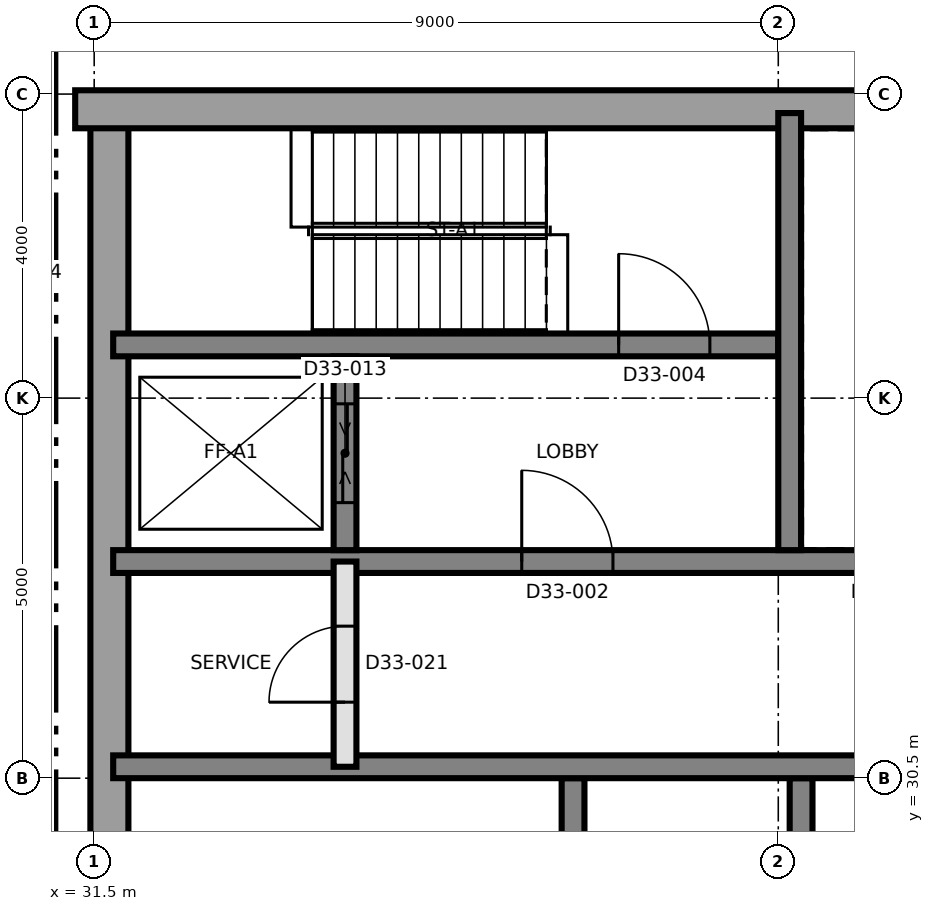
"""IFC4 building model, lengths in metres.
Left out: names, types, materials, properties, quantities, classifications, styles, units other than length and angle.
Written with IfcOpenShell. Run it as: python <this file> out.ifc"""

import sys

from ifc_helpers import new_model, si_unit, direction, frame, frame_2d, origin, place, context, subcontext, project, spatial, rectangle, extrude, element, fill, save


model = new_model("IFC4")
c1 = context("Model", 3, precision=1e-05, world=origin(), true_north=direction((0.0, 1.0)))
c2 = subcontext(c1, "Body", "Model", "MODEL_VIEW")
j1 = project(units=[si_unit("LENGTHUNIT", "METRE"), si_unit("PLANEANGLEUNIT", "RADIAN")], contexts=[c1])
p1 = place(None, origin())
s1 = spatial("IfcSite", under=j1, at=p1, CompositionType="ELEMENT")
p2 = place(p1, origin())
s2 = spatial("IfcBuilding", under=s1, at=p2, CompositionType="ELEMENT")
p3 = place(p2, frame((0.0, 0.0, 277.1)))
s3 = spatial("IfcBuildingStorey", under=s2, at=p3, CompositionType="ELEMENT", Elevation=277.1)
p4 = place(p3, frame((31.7, 21.75, 0.0), z_axis=(0.0, 0.0, 1.0), x_axis=(0.0, 1.0, 0.0)))
e1 = element("IfcWall", 1, at=p4, inside=s3, PredefinedType="SHEAR", context=c2, shape_type="SweptSolid", body=[
    extrude(rectangle(XDim=17.5, YDim=0.5, at=frame_2d((8.75, 0.0))), origin(), (0.0, 0.0, 1.0), 4.2),
])
p5 = place(p3, frame((31.25, 39.3, 0.0), z_axis=(0.0, 0.0, 1.0), x_axis=(1.0, 0.0, 0.0)))
e2 = element("IfcWall", 2, at=p5, inside=s3, PredefinedType="SHEAR", context=c2, shape_type="SweptSolid", body=[
    extrude(rectangle(XDim=27.0, YDim=0.5, at=frame_2d((13.5, 0.0))), origin(), (0.0, 0.0, 1.0), 4.2),
])
p6 = place(p3, frame((37.8, 21.75, 0.0), z_axis=(0.0, 0.0, 1.0), x_axis=(0.0, 1.0, 0.0)))
e3 = element("IfcWall", 3, at=p6, inside=s3, PredefinedType="SHEAR", context=c2, shape_type="SweptSolid", body=[
    extrude(rectangle(XDim=8.75, YDim=0.3, at=frame_2d((4.375, 0.0))), origin(), (0.0, 0.0, 1.0), 4.2),
])
p7 = place(p6, frame((5.525, 0.0, 0.0)))
e4 = element("IfcOpeningElement", 4, at=p7, cuts=e3, PredefinedType="OPENING", context=c2, shape_type="SweptSolid", body=[
    extrude(rectangle(XDim=1.0, YDim=2.1, at=frame_2d((0.5, 1.05))), frame((0.0, 0.16, 0.0), z_axis=(0.0, -1.0, 0.0), x_axis=(1.0, 0.0, 0.0)), (0.0, 0.0, 1.0), 0.32),
])
p8 = place(p3, frame((40.8, 21.75, 0.0), z_axis=(0.0, 0.0, 1.0), x_axis=(0.0, 1.0, 0.0)))
e5 = element("IfcWall", 5, at=p8, inside=s3, PredefinedType="SHEAR", context=c2, shape_type="SweptSolid", body=[
    extrude(rectangle(XDim=8.75, YDim=0.3, at=frame_2d((4.375, 0.0))), origin(), (0.0, 0.0, 1.0), 4.2),
])
p9 = place(p8, frame((4.338, 0.0, 0.0)))
e6 = element("IfcOpeningElement", 6, at=p9, cuts=e5, PredefinedType="OPENING", context=c2, shape_type="SweptSolid", body=[
    extrude(rectangle(XDim=1.0, YDim=2.1, at=frame_2d((0.5, 1.05))), frame((0.0, 0.16, 0.0), z_axis=(0.0, -1.0, 0.0), x_axis=(1.0, 0.0, 0.0)), (0.0, 0.0, 1.0), 0.32),
])
p10 = place(p3, frame((31.75, 30.65, 0.0), z_axis=(0.0, 0.0, 1.0), x_axis=(1.0, 0.0, 0.0)))
e7 = element("IfcWall", 7, at=p10, inside=s3, PredefinedType="SHEAR", context=c2, shape_type="SweptSolid", body=[
    extrude(rectangle(XDim=26.5, YDim=0.3, at=frame_2d((13.25, 0.0))), origin(), (0.0, 0.0, 1.0), 4.2),
])
p11 = place(p10, frame((24.75, 0.0, 0.0)))
e8 = element("IfcOpeningElement", 8, at=p11, cuts=e7, PredefinedType="OPENING", context=c2, shape_type="SweptSolid", body=[
    extrude(rectangle(XDim=1.0, YDim=2.1, at=frame_2d((0.5, 1.05))), frame((0.0, 0.16, 0.0), z_axis=(0.0, -1.0, 0.0), x_axis=(1.0, 0.0, 0.0)), (0.0, 0.0, 1.0), 0.32),
])
p12 = place(p10, frame((11.55, 0.0, 0.0)))
e9 = element("IfcOpeningElement", 9, at=p12, cuts=e7, PredefinedType="OPENING", context=c2, shape_type="SweptSolid", body=[
    extrude(rectangle(XDim=1.0, YDim=2.1, at=frame_2d((0.5, 1.05))), frame((0.0, 0.16, 0.0), z_axis=(0.0, -1.0, 0.0), x_axis=(1.0, 0.0, 0.0)), (0.0, 0.0, 1.0), 0.32),
])
p13 = place(p3, frame((31.75, 33.35, 0.0), z_axis=(0.0, 0.0, 1.0), x_axis=(1.0, 0.0, 0.0)))
e10 = element("IfcWall", 10, at=p13, inside=s3, PredefinedType="SHEAR", context=c2, shape_type="SweptSolid", body=[
    extrude(rectangle(XDim=26.5, YDim=0.3, at=frame_2d((13.25, 0.0))), origin(), (0.0, 0.0, 1.0), 4.2),
])
p14 = place(p13, frame((13.9, 0.0, 0.0)))
e11 = element("IfcOpeningElement", 11, at=p14, cuts=e10, PredefinedType="OPENING", context=c2, shape_type="SweptSolid", body=[
    extrude(rectangle(XDim=1.4, YDim=2.1, at=frame_2d((0.7, 1.05))), frame((0.0, 0.16, 0.0), z_axis=(0.0, -1.0, 0.0), x_axis=(1.0, 0.0, 0.0)), (0.0, 0.0, 1.0), 0.32),
])
p15 = place(p13, frame((5.375, 0.0, 0.0)))
e12 = element("IfcOpeningElement", 12, at=p15, cuts=e10, PredefinedType="OPENING", context=c2, shape_type="SweptSolid", body=[
    extrude(rectangle(XDim=1.2, YDim=2.1, at=frame_2d((0.6, 1.05))), frame((0.0, 0.16, 0.0), z_axis=(0.0, -1.0, 0.0), x_axis=(1.0, 0.0, 0.0)), (0.0, 0.0, 1.0), 0.32),
])
p16 = place(p13, frame((19.925, 0.0, 0.0)))
e13 = element("IfcOpeningElement", 13, at=p16, cuts=e10, PredefinedType="OPENING", context=c2, shape_type="SweptSolid", body=[
    extrude(rectangle(XDim=1.2, YDim=2.1, at=frame_2d((0.6, 1.05))), frame((0.0, 0.16, 0.0), z_axis=(0.0, -1.0, 0.0), x_axis=(1.0, 0.0, 0.0)), (0.0, 0.0, 1.0), 0.32),
])
p17 = place(p13, frame((9.8, 0.0, 0.0)))
e14 = element("IfcOpeningElement", 14, at=p17, cuts=e10, PredefinedType="OPENING", context=c2, shape_type="SweptSolid", body=[
    extrude(rectangle(XDim=0.9, YDim=2.1, at=frame_2d((0.45, 1.05))), frame((0.0, 0.16, 0.0), z_axis=(0.0, -1.0, 0.0), x_axis=(1.0, 0.0, 0.0)), (0.0, 0.0, 1.0), 0.32),
])
p18 = place(p3, frame((31.75, 36.2, 0.0), z_axis=(0.0, 0.0, 1.0), x_axis=(1.0, 0.0, 0.0)))
e15 = element("IfcWall", 15, at=p18, inside=s3, PredefinedType="SHEAR", context=c2, shape_type="SweptSolid", body=[
    extrude(rectangle(XDim=8.75, YDim=0.3, at=frame_2d((4.375, 0.0))), origin(), (0.0, 0.0, 1.0), 4.2),
])
p19 = place(p18, frame((6.65, 0.0, 0.0)))
e16 = element("IfcOpeningElement", 16, at=p19, cuts=e15, PredefinedType="OPENING", context=c2, shape_type="SweptSolid", body=[
    extrude(rectangle(XDim=1.2, YDim=2.1, at=frame_2d((0.6, 1.05))), frame((0.0, 0.16, 0.0), z_axis=(0.0, -1.0, 0.0), x_axis=(1.0, 0.0, 0.0)), (0.0, 0.0, 1.0), 0.32),
])
p20 = place(p3, frame((40.65, 33.5, 0.0), z_axis=(0.0, 0.0, 1.0), x_axis=(0.0, 1.0, 0.0)))
e17 = element("IfcWall", 17, at=p20, inside=s3, PredefinedType="SHEAR", context=c2, shape_type="SweptSolid", body=[
    extrude(rectangle(XDim=5.75, YDim=0.3, at=frame_2d((2.875, 0.0))), origin(), (0.0, 0.0, 1.0), 4.2),
])
p21 = place(p3, frame((34.8, 33.5, 0.0), z_axis=(0.0, 0.0, 1.0), x_axis=(0.0, 1.0, 0.0)))
e18 = element("IfcWall", 18, at=p21, inside=s3, PredefinedType="SHEAR", context=c2, shape_type="SweptSolid", body=[
    extrude(rectangle(XDim=2.55, YDim=0.3, at=frame_2d((1.275, 0.0))), origin(), (0.0, 0.0, 1.0), 4.2),
])
p22 = place(p21, frame((0.625, 0.0, 0.0)))
e19 = element("IfcOpeningElement", 19, at=p22, cuts=e18, PredefinedType="OPENING", context=c2, shape_type="SweptSolid", body=[
    extrude(rectangle(XDim=1.3, YDim=2.4, at=frame_2d((0.65, 1.2))), frame((0.0, 0.16, 0.0), z_axis=(0.0, -1.0, 0.0), x_axis=(1.0, 0.0, 0.0)), (0.0, 0.0, 1.0), 0.32),
])
p23 = place(p3, frame((34.8, 30.65, 0.0), z_axis=(0.0, 0.0, 1.0), x_axis=(0.0, 1.0, 0.0)))
e20 = element("IfcWall", 20, at=p23, inside=s3, PredefinedType="SOLIDWALL", context=c2, shape_type="SweptSolid", body=[
    extrude(rectangle(XDim=2.7, YDim=0.3, at=frame_2d((1.35, 0.0))), origin(), (0.0, 0.0, 1.0), 3.9),
])
p24 = place(p23, frame((0.85, 0.0, 0.0)))
e21 = element("IfcOpeningElement", 21, at=p24, cuts=e20, PredefinedType="OPENING", context=c2, shape_type="SweptSolid", body=[
    extrude(rectangle(XDim=1.0, YDim=2.1, at=frame_2d((0.5, 1.05))), frame((0.0, 0.16, 0.0), z_axis=(0.0, -1.0, 0.0), x_axis=(1.0, 0.0, 0.0)), (0.0, 0.0, 1.0), 0.32),
])
p25 = place(p15, origin())
e22 = element("IfcDoor", 22, at=p25, inside=s3, OperationType="SINGLE_SWING_LEFT", PredefinedType="DOOR", context=c2, shape_type="SweptSolid", body=[
    extrude(rectangle(XDim=1.2, YDim=2.1, at=frame_2d((0.6, 1.05))), frame((0.0, 0.025, 0.0), z_axis=(0.0, -1.0, 0.0), x_axis=(1.0, 0.0, 0.0)), (0.0, 0.0, 1.0), 0.05),
])
fill(e12, e22)
p26 = place(p19, origin())
e23 = element("IfcDoor", 23, at=p26, inside=s3, OperationType="SINGLE_SWING_RIGHT", PredefinedType="DOOR", context=c2, shape_type="SweptSolid", body=[
    extrude(rectangle(XDim=1.2, YDim=2.1, at=frame_2d((0.6, 1.05))), frame((0.0, 0.025, 0.0), z_axis=(0.0, -1.0, 0.0), x_axis=(1.0, 0.0, 0.0)), (0.0, 0.0, 1.0), 0.05),
])
fill(e16, e23)
p27 = place(p22, origin())
e24 = element("IfcDoor", 24, at=p27, inside=s3, OperationType="SLIDING_TO_LEFT", PredefinedType="DOOR", context=c2, shape_type="SweptSolid", body=[
    extrude(rectangle(XDim=1.3, YDim=2.4, at=frame_2d((0.65, 1.2))), frame((0.0, 0.025, 0.0), z_axis=(0.0, -1.0, 0.0), x_axis=(1.0, 0.0, 0.0)), (0.0, 0.0, 1.0), 0.05),
])
fill(e19, e24)
p28 = place(p24, origin())
e25 = element("IfcDoor", 25, at=p28, inside=s3, OperationType="SINGLE_SWING_LEFT", PredefinedType="DOOR", context=c2, shape_type="SweptSolid", body=[
    extrude(rectangle(XDim=1.0, YDim=2.1, at=frame_2d((0.5, 1.05))), frame((0.0, 0.025, 0.0), z_axis=(0.0, -1.0, 0.0), x_axis=(1.0, 0.0, 0.0)), (0.0, 0.0, 1.0), 0.05),
])
fill(e21, e25)
save(model, sys.argv[1])
